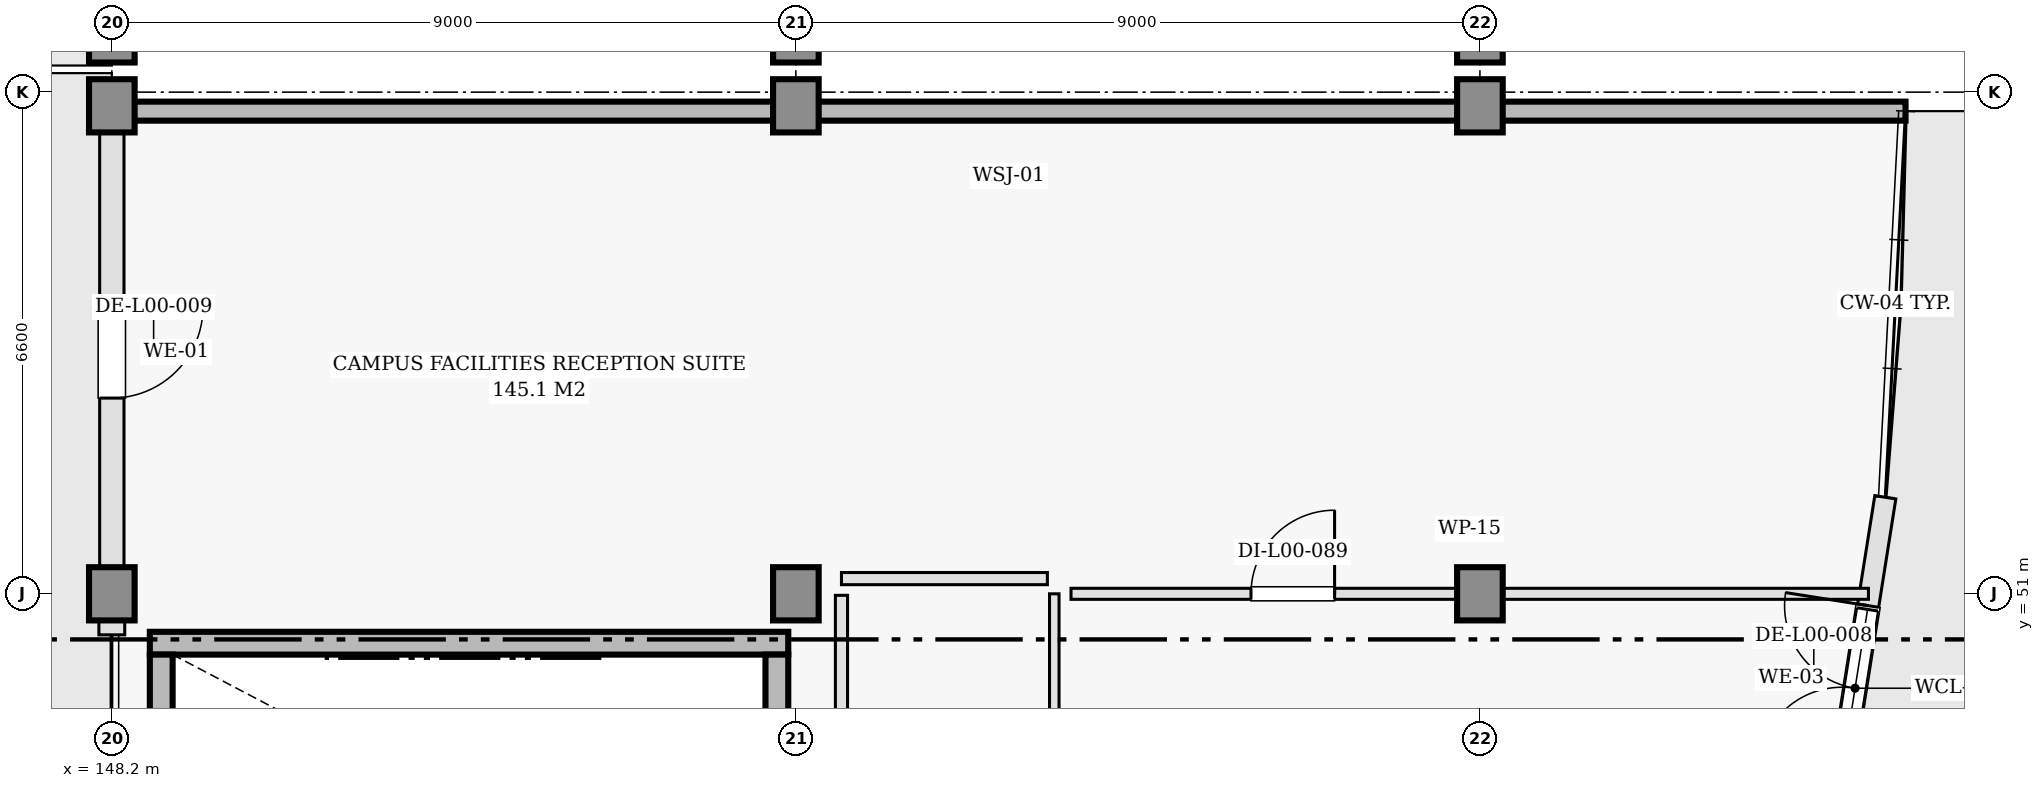
"""IFC4 building model, lengths in metres.
Left out: names, types, materials, properties, quantities, classifications, styles, units other than length and angle.
Written with IfcOpenShell. Run it as: python <this file> out.ifc"""

import sys

from ifc_helpers import new_model, si_unit, direction, frame, frame_2d, origin, origin_2d, place, context, subcontext, project, spatial, rectangle, extrude, element, fill, save


model = new_model("IFC4")
c1 = context("Model", 3, precision=1e-05, world=origin(), true_north=direction((0.0, 1.0)))
c2 = subcontext(c1, "Body", "Model", "MODEL_VIEW")
j1 = project(units=[si_unit("LENGTHUNIT", "METRE"), si_unit("PLANEANGLEUNIT", "RADIAN")], contexts=[c1])
p1 = place(None, origin())
s1 = spatial("IfcSite", under=j1, at=p1, CompositionType="ELEMENT")
p2 = place(p1, origin())
s2 = spatial("IfcBuilding", under=s1, at=p2, CompositionType="ELEMENT")
p3 = place(p2, origin())
s3 = spatial("IfcBuildingStorey", under=s2, at=p3, CompositionType="ELEMENT", Elevation=0.0)
for number, where, z_axis, x_axis in (
    (1, (148.2, 51.0, 0.0), (0.0, 0.0, 1.0), (1.0, 0.0, 0.0)),
    (2, (148.2, 57.42, 0.0), (0.0, 0.0, 1.0), (1.0, 0.0, 0.0)),
    (3, (157.2, 51.0, 0.0), (0.0, 0.0, 1.0), (1.0, 0.0, 0.0)),
    (4, (157.2, 57.42, 0.0), (0.0, 0.0, 1.0), (1.0, 0.0, 0.0)),
    (5, (166.2, 51.0, 0.0), (0.0, 0.0, 1.0), (1.0, 0.0, 0.0)),
    (6, (166.2, 57.42, 0.0), (0.0, 0.0, 1.0), (1.0, 0.0, 0.0)),
):
    element("IfcColumn", number, at=place(p3, frame(where, z_axis=z_axis, x_axis=x_axis)), inside=s3, PredefinedType="COLUMN", context=c2, shape_type="SweptSolid", body=[
        extrude(rectangle(XDim=0.7, YDim=0.7, at=origin_2d()), origin(), (0.0, 0.0, 1.0), 4.8),
    ])
for number, where, z_axis, x_axis in (
    (7, (148.2, 58.2, 0.0), (0.0, 0.0, 1.0), (1.0, 0.0, 0.0)),
    (8, (157.2, 58.2, 0.0), (0.0, 0.0, 1.0), (1.0, 0.0, 0.0)),
    (9, (166.2, 58.2, 0.0), (0.0, 0.0, 1.0), (1.0, 0.0, 0.0)),
):
    element("IfcColumn", number, at=place(p3, frame(where, z_axis=z_axis, x_axis=x_axis)), inside=s3, PredefinedType="COLUMN", context=c2, shape_type="SweptSolid", body=[
        extrude(rectangle(XDim=0.42, YDim=0.42, at=origin_2d()), origin(), (0.0, 0.0, 1.0), 4.8),
    ])
p4 = place(p3, frame((170.738, 47.245, 0.0), z_axis=(0.0, 0.0, 1.0), x_axis=(0.156440618646, 0.98768736594, 0.0)))
e10 = element("IfcWall", 10, at=p4, inside=s3, PredefinedType="SOLIDWALL", context=c2, shape_type="SweptSolid", body=[
    extrude(rectangle(XDim=5.088, YDim=0.28, at=frame_2d((2.544, 0.0))), origin(), (0.0, 0.0, 1.0), 4.52),
])
p5 = place(p4, frame((1.444, 0.0, 0.0)))
e11 = element("IfcOpeningElement", 11, at=p5, cuts=e10, PredefinedType="OPENING", context=c2, shape_type="SweptSolid", body=[
    extrude(rectangle(XDim=2.2, YDim=2.35, at=frame_2d((1.1, 1.175))), frame((0.0, 0.15, 0.0), z_axis=(0.0, -1.0, 0.0), x_axis=(1.0, 0.0, 0.0)), (0.0, 0.0, 1.0), 0.3),
])
p6 = place(p4, frame((1.494, 0.0, 2.53)))
e12 = element("IfcOpeningElement", 12, at=p6, cuts=e10, PredefinedType="OPENING", context=c2, shape_type="SweptSolid", body=[
    extrude(rectangle(XDim=2.1, YDim=0.95, at=frame_2d((1.05, 0.475))), frame((0.0, 0.15, 0.0), z_axis=(0.0, -1.0, 0.0), x_axis=(1.0, 0.0, 0.0)), (0.0, 0.0, 1.0), 0.3),
])
p7 = place(p3, frame((171.8, 57.35, 0.0), z_axis=(0.0, 0.0, 1.0), x_axis=(-1.0, 0.0, 0.0)))
e13 = element("IfcWall", 13, at=p7, inside=s3, PredefinedType="SHEAR", context=c2, shape_type="SweptSolid", body=[
    extrude(rectangle(XDim=23.6, YDim=0.25, at=frame_2d((11.8, 0.0))), origin(), (0.0, 0.0, 1.0), 4.52),
])
p8 = place(p3, frame((148.2, 57.35, 0.0), z_axis=(0.0, 0.0, 1.0), x_axis=(0.0, -1.0, 0.0)))
e14 = element("IfcWall", 14, at=p8, inside=s3, PredefinedType="SOLIDWALL", context=c2, shape_type="SweptSolid", body=[
    extrude(rectangle(XDim=6.35, YDim=0.32, at=frame_2d((3.175, 0.0))), origin(), (0.0, 0.0, 1.0), 3.705),
])
p9 = place(p8, frame((2.575, 0.0, 0.0)))
e15 = element("IfcOpeningElement", 15, at=p9, cuts=e14, PredefinedType="OPENING", context=c2, shape_type="SweptSolid", body=[
    extrude(rectangle(XDim=1.2, YDim=2.2, at=frame_2d((0.6, 1.1))), frame((0.0, 0.17, 0.0), z_axis=(0.0, -1.0, 0.0), x_axis=(1.0, 0.0, 0.0)), (0.0, 0.0, 1.0), 0.34),
])
p10 = place(p3, frame((148.2, 51.0, 0.0), z_axis=(0.0, 0.0, 1.0), x_axis=(0.0, -1.0, 0.0)))
e16 = element("IfcWall", 16, at=p10, inside=s3, PredefinedType="SOLIDWALL", context=c2, shape_type="SweptSolid", body=[
    extrude(rectangle(XDim=0.54, YDim=0.34, at=frame_2d((0.27, 0.0))), origin(), (0.0, 0.0, 1.0), 3.705),
])
p11 = place(p3, frame((148.7, 50.35, 0.0), z_axis=(0.0, 0.0, 1.0), x_axis=(1.0, 0.0, 0.0)))
e17 = element("IfcWall", 17, at=p11, inside=s3, PredefinedType="SHEAR", context=c2, shape_type="SweptSolid", body=[
    extrude(rectangle(XDim=8.4, YDim=0.3, at=frame_2d((4.2, 0.0))), origin(), (0.0, 0.0, 1.0), 4.52),
])
for number, where, z_axis, x_axis in (
    (18, (148.85, 46.1, 0.0), (0.0, 0.0, 1.0), (0.0, 1.0, 0.0)),
    (19, (156.95, 46.1, 0.0), (0.0, 0.0, 1.0), (0.0, 1.0, 0.0)),
):
    element("IfcWall", number, at=place(p3, frame(where, z_axis=z_axis, x_axis=x_axis)), inside=s3, PredefinedType="SHEAR", context=c2, shape_type="SweptSolid", body=[
        extrude(rectangle(XDim=4.1, YDim=0.3, at=frame_2d((2.05, 0.0))), origin(), (0.0, 0.0, 1.0), 4.52),
    ])
p12 = place(p3, frame((160.6, 43.22, 0.0), z_axis=(0.0, 0.0, 1.0), x_axis=(0.0, 1.0, 0.0)))
e20 = element("IfcWall", 20, at=p12, inside=s3, PredefinedType="PARTITIONING", context=c2, shape_type="SweptSolid", body=[
    extrude(rectangle(XDim=7.78, YDim=0.125, at=frame_2d((3.89, 0.0))), origin(), (0.0, 0.0, 1.0), 3.705),
])
p13 = place(p3, frame((160.82, 51.0, 0.0), z_axis=(0.0, 0.0, 1.0), x_axis=(1.0, 0.0, 0.0)))
e21 = element("IfcWall", 21, at=p13, inside=s3, PredefinedType="PARTITIONING", context=c2, shape_type="SweptSolid", body=[
    extrude(rectangle(XDim=10.492, YDim=0.145, at=frame_2d((5.246, 0.0))), origin(), (0.0, 0.0, 1.0), 3.705),
])
p14 = place(p13, frame((2.368, 0.0, 0.0)))
e22 = element("IfcOpeningElement", 22, at=p14, cuts=e21, PredefinedType="OPENING", context=c2, shape_type="SweptSolid", body=[
    extrude(rectangle(XDim=1.1, YDim=2.15, at=frame_2d((0.55, 1.075))), frame((0.0, 0.083, 0.0), z_axis=(0.0, -1.0, 0.0), x_axis=(1.0, 0.0, 0.0)), (0.0, 0.0, 1.0), 0.165),
])
p15 = place(p3, frame((157.8, 51.2, 0.0), z_axis=(0.0, 0.0, 1.0), x_axis=(1.0, 0.0, 0.0)))
e23 = element("IfcWall", 23, at=p15, inside=s3, PredefinedType="PARTITIONING", context=c2, shape_type="SweptSolid", body=[
    extrude(rectangle(XDim=2.709, YDim=0.16, at=frame_2d((1.354, 0.0))), origin(), (0.0, 0.0, 1.0), 3.705),
])
p16 = place(p3, frame((157.8, 43.22, 0.0), z_axis=(0.0, 0.0, 1.0), x_axis=(0.0, 1.0, 0.0)))
e24 = element("IfcWall", 24, at=p16, inside=s3, PredefinedType="PARTITIONING", context=c2, shape_type="SweptSolid", body=[
    extrude(rectangle(XDim=7.76, YDim=0.16, at=frame_2d((3.88, 0.0))), origin(), (0.0, 0.0, 1.0), 3.705),
])
p17 = place(p5, origin())
e25 = element("IfcDoor", 25, at=p17, inside=s3, OperationType="DOUBLE_DOOR_SINGLE_SWING", PredefinedType="DOOR", context=c2, shape_type="SweptSolid", body=[
    extrude(rectangle(XDim=2.2, YDim=2.35, at=frame_2d((1.1, 1.175))), frame((0.0, 0.025, 0.0), z_axis=(0.0, -1.0, 0.0), x_axis=(1.0, 0.0, 0.0)), (0.0, 0.0, 1.0), 0.05),
])
fill(e11, e25)
p18 = place(p6, origin())
e26 = element("IfcWindow", 26, at=p18, inside=s3, PartitioningType="DOUBLE_PANEL_VERTICAL", PredefinedType="WINDOW", context=c2, shape_type="SweptSolid", body=[
    extrude(rectangle(XDim=2.1, YDim=0.95, at=frame_2d((1.05, 0.475))), frame((0.0, 0.03, 0.0), z_axis=(0.0, -1.0, 0.0), x_axis=(1.0, 0.0, 0.0)), (0.0, 0.0, 1.0), 0.06),
])
fill(e12, e26)
p19 = place(p9, origin())
e27 = element("IfcDoor", 27, at=p19, inside=s3, OperationType="SINGLE_SWING_LEFT", PredefinedType="DOOR", context=c2, shape_type="SweptSolid", body=[
    extrude(rectangle(XDim=1.2, YDim=2.2, at=frame_2d((0.6, 1.1))), frame((0.0, 0.025, 0.0), z_axis=(0.0, -1.0, 0.0), x_axis=(1.0, 0.0, 0.0)), (0.0, 0.0, 1.0), 0.05),
])
fill(e15, e27)
p20 = place(p14, origin())
e28 = element("IfcDoor", 28, at=p20, inside=s3, OperationType="SINGLE_SWING_RIGHT", PredefinedType="DOOR", context=c2, shape_type="SweptSolid", body=[
    extrude(rectangle(XDim=1.1, YDim=2.15, at=frame_2d((0.55, 1.075))), frame((0.0, 0.025, 0.0), z_axis=(0.0, -1.0, 0.0), x_axis=(1.0, 0.0, 0.0)), (0.0, 0.0, 1.0), 0.05),
])
fill(e22, e28)
save(model, sys.argv[1])
